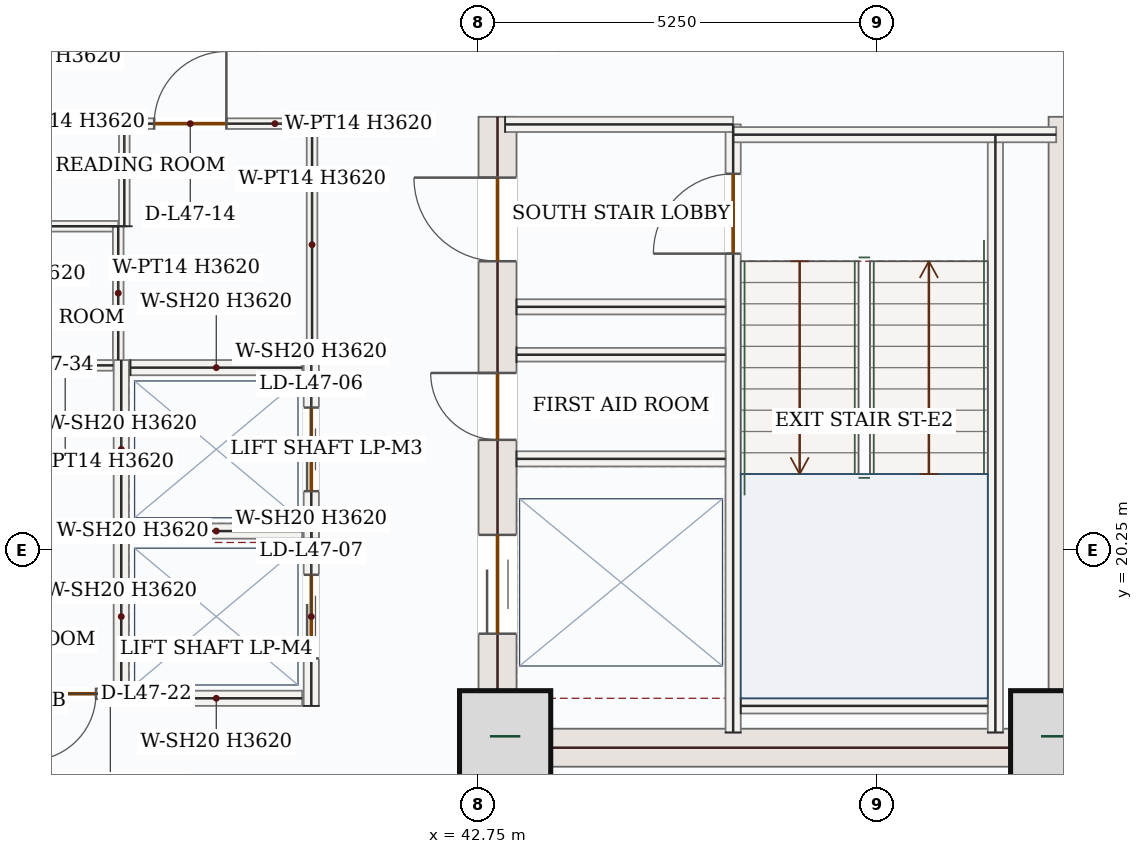
"""IFC4 building model, lengths in metres.
Left out: names, types, materials, properties, quantities, classifications, styles, units other than length and angle.
Written with IfcOpenShell. Run it as: python <this file> out.ifc"""

import sys

from ifc_helpers import new_model, si_unit, direction, frame, frame_2d, origin, origin_2d, place, context, subcontext, project, spatial, rectangle, extrude, source, transform, mapped, element, fill, save


model = new_model("IFC4")
c1 = context("Model", 3, precision=1e-05, world=origin(), true_north=direction((0.0, 1.0)))
c2 = subcontext(c1, "Body", "Model", "MODEL_VIEW")
j1 = project(units=[si_unit("LENGTHUNIT", "METRE"), si_unit("PLANEANGLEUNIT", "RADIAN")], contexts=[c1])
p1 = place(None, origin())
s1 = spatial("IfcSite", under=j1, at=p1, CompositionType="ELEMENT")
p2 = place(p1, origin())
s2 = spatial("IfcBuilding", under=s1, at=p2, CompositionType="ELEMENT")
p3 = place(p2, frame((0.0, 0.0, 201.9)))
s3 = spatial("IfcBuildingStorey", under=s2, at=p3, CompositionType="ELEMENT", Elevation=201.9)
p4 = place(p3, frame((43.0, 17.4, 0.0), z_axis=(0.0, 0.0, 1.0), x_axis=(0.0, 1.0, 0.0)))
e1 = element("IfcWall", 1, at=p4, inside=s3, PredefinedType="SHEAR", context=c2, shape_type="SweptSolid", body=[
    extrude(rectangle(XDim=8.55, YDim=0.5, at=frame_2d((4.275, 0.0))), origin(), (0.0, 0.0, 1.0), 3.62),
])
p5 = place(p4, frame((6.65, 0.0, 0.0)))
e2 = element("IfcOpeningElement", 2, at=p5, cuts=e1, PredefinedType="OPENING", context=c2, shape_type="SweptSolid", body=[
    extrude(rectangle(XDim=1.1, YDim=2.2, at=frame_2d((0.55, 1.1))), frame((0.0, 0.26, 0.0), z_axis=(0.0, -1.0, 0.0), x_axis=(1.0, 0.0, 0.0)), (0.0, 0.0, 1.0), 0.52),
])
p6 = place(p4, frame((1.75, 0.0, 0.0)))
e3 = element("IfcOpeningElement", 3, at=p6, cuts=e1, PredefinedType="OPENING", context=c2, shape_type="SweptSolid", body=[
    extrude(rectangle(XDim=1.3, YDim=2.2, at=frame_2d((0.65, 1.1))), frame((0.0, 0.26, 0.0), z_axis=(0.0, -1.0, 0.0), x_axis=(1.0, 0.0, 0.0)), (0.0, 0.0, 1.0), 0.52),
])
p7 = place(p4, frame((4.3, 0.0, 0.0)))
e4 = element("IfcOpeningElement", 4, at=p7, cuts=e1, PredefinedType="OPENING", context=c2, shape_type="SweptSolid", body=[
    extrude(rectangle(XDim=0.88, YDim=2.1, at=frame_2d((0.44, 1.05))), frame((0.0, 0.26, 0.0), z_axis=(0.0, -1.0, 0.0), x_axis=(1.0, 0.0, 0.0)), (0.0, 0.0, 1.0), 0.52),
])
m1 = source(origin(), c2, "Body", "SweptSolid", [
    extrude(rectangle(XDim=8.55, YDim=0.5, at=frame_2d((4.275, 0.0))), origin(), (0.0, 0.0, 1.0), 3.62),
])
p8 = place(p3, frame((50.5, 17.4, 0.0), z_axis=(0.0, 0.0, 1.0), x_axis=(0.0, 1.0, 0.0)))
e5 = element("IfcWall", 5, at=p8, inside=s3, PredefinedType="SHEAR", context=c2, shape_type="MappedRepresentation", body=[
    mapped(m1, transform((0.0, 0.0, 0.0), x_axis=(1.0, 0.0, 0.0), y_axis=(0.0, 1.0, 0.0), z_axis=(0.0, 0.0, 1.0), scale=1.0)),
])
m2 = source(origin(), c2, "Body", "SweptSolid", [
    extrude(rectangle(XDim=7.0, YDim=0.5, at=frame_2d((3.5, 0.0))), origin(), (0.0, 0.0, 1.0), 3.62),
])
p9 = place(p3, frame((43.25, 17.65, 0.0), z_axis=(0.0, 0.0, 1.0), x_axis=(1.0, 0.0, 0.0)))
e6 = element("IfcWall", 6, at=p9, inside=s3, PredefinedType="SHEAR", context=c2, shape_type="MappedRepresentation", body=[
    mapped(m2, transform((0.0, 0.0, 0.0), x_axis=(1.0, 0.0, 0.0), y_axis=(0.0, 1.0, 0.0), z_axis=(0.0, 0.0, 1.0), scale=1.0)),
])
m3 = source(origin(), c2, "Body", "SweptSolid", [
    extrude(rectangle(XDim=1.2, YDim=1.2, at=origin_2d()), origin(), (0.0, 0.0, 1.0), 3.9),
])
for number, where, z_axis, x_axis in (
    (7, (43.1, 17.8, 0.0), (0.0, 0.0, 1.0), (1.0, 0.0, 0.0)),
    (8, (50.35, 17.8, 0.0), (0.0, 0.0, 1.0), (1.0, 0.0, 0.0)),
):
    element("IfcColumn", number, at=place(p3, frame(where, z_axis=z_axis, x_axis=x_axis)), inside=s3, PredefinedType="COLUMN", context=c2, shape_type="MappedRepresentation", body=[
        mapped(m3, transform((0.0, 0.0, 0.0), x_axis=(1.0, 0.0, 0.0), y_axis=(0.0, 1.0, 0.0), z_axis=(0.0, 0.0, 1.0), scale=1.0)),
    ])
m4 = source(origin(), c2, "Body", "SweptSolid", [
    extrude(rectangle(XDim=5.258, YDim=0.28, at=frame_2d((2.629, 0.0))), origin(), (0.0, 0.0, 1.0), 3.62),
])
p10 = place(p3, frame((53.06, 18.458, 0.0), z_axis=(0.0, 0.0, 1.0), x_axis=(-0.707106781187, -0.707106781187, 0.0)))
e9 = element("IfcWall", 9, at=p10, inside=s3, PredefinedType="SOLIDWALL", context=c2, shape_type="MappedRepresentation", body=[
    mapped(m4, transform((0.0, 0.0, 0.0), x_axis=(1.0, 0.0, 0.0), y_axis=(0.0, 1.0, 0.0), z_axis=(0.0, 0.0, 1.0), scale=1.0)),
])
m5 = source(origin(), c2, "Body", "SweptSolid", [
    extrude(rectangle(XDim=7.87, YDim=0.2, at=frame_2d((3.935, 0.0))), origin(), (0.0, 0.0, 1.0), 3.62),
])
p11 = place(p3, frame((49.55, 17.85, 0.0), z_axis=(0.0, 0.0, 1.0), x_axis=(0.0, 1.0, 0.0)))
e10 = element("IfcWall", 10, at=p11, inside=s3, PredefinedType="SOLIDWALL", context=c2, shape_type="MappedRepresentation", body=[
    mapped(m5, transform((0.0, 0.0, 0.0), x_axis=(1.0, 0.0, 0.0), y_axis=(0.0, 1.0, 0.0), z_axis=(0.0, 0.0, 1.0), scale=1.0)),
])
p12 = place(p3, frame((46.1, 17.85, 0.0), z_axis=(0.0, 0.0, 1.0), x_axis=(0.0, 1.0, 0.0)))
e11 = element("IfcWall", 11, at=p12, inside=s3, PredefinedType="SOLIDWALL", context=c2, shape_type="SweptSolid", body=[
    extrude(rectangle(XDim=8.0, YDim=0.2, at=frame_2d((4.0, 0.0))), origin(), (0.0, 0.0, 1.0), 3.62),
])
p13 = place(p12, frame((6.3, 0.0, 0.0)))
e12 = element("IfcOpeningElement", 12, at=p13, cuts=e11, PredefinedType="OPENING", context=c2, shape_type="SweptSolid", body=[
    extrude(rectangle(XDim=1.05, YDim=2.15, at=frame_2d((0.525, 1.075))), frame((0.0, 0.11, 0.0), z_axis=(0.0, -1.0, 0.0), x_axis=(1.0, 0.0, 0.0)), (0.0, 0.0, 1.0), 0.22),
])
m6 = source(origin(), c2, "Body", "SweptSolid", [
    extrude(rectangle(XDim=3.0, YDim=0.2, at=frame_2d((1.5, 0.0))), origin(), (0.0, 0.0, 1.0), 3.62),
])
p14 = place(p3, frame((43.1, 25.85, 0.0), z_axis=(0.0, 0.0, 1.0), x_axis=(1.0, 0.0, 0.0)))
e13 = element("IfcWall", 13, at=p14, inside=s3, PredefinedType="SOLIDWALL", context=c2, shape_type="MappedRepresentation", body=[
    mapped(m6, transform((0.0, 0.0, 0.0), x_axis=(1.0, 0.0, 0.0), y_axis=(0.0, 1.0, 0.0), z_axis=(0.0, 0.0, 1.0), scale=1.0)),
])
m7 = source(origin(), c2, "Body", "SweptSolid", [
    extrude(rectangle(XDim=4.25, YDim=0.2, at=frame_2d((2.125, 0.0))), origin(), (0.0, 0.0, 1.0), 3.62),
])
p15 = place(p3, frame((46.1, 25.715, 0.0), z_axis=(0.0, 0.0, 1.0), x_axis=(1.0, 0.0, 0.0)))
e14 = element("IfcWall", 14, at=p15, inside=s3, PredefinedType="SOLIDWALL", context=c2, shape_type="MappedRepresentation", body=[
    mapped(m7, transform((0.0, 0.0, 0.0), x_axis=(1.0, 0.0, 0.0), y_axis=(0.0, 1.0, 0.0), z_axis=(0.0, 0.0, 1.0), scale=1.0)),
])
m8 = source(origin(), c2, "Body", "SweptSolid", [
    extrude(rectangle(XDim=3.25, YDim=0.2, at=frame_2d((1.625, 0.0))), origin(), (0.0, 0.0, 1.0), 3.62),
])
p16 = place(p3, frame((46.2, 18.2, 0.0), z_axis=(0.0, 0.0, 1.0), x_axis=(1.0, 0.0, 0.0)))
e15 = element("IfcWall", 15, at=p16, inside=s3, PredefinedType="SOLIDWALL", context=c2, shape_type="MappedRepresentation", body=[
    mapped(m8, transform((0.0, 0.0, 0.0), x_axis=(1.0, 0.0, 0.0), y_axis=(0.0, 1.0, 0.0), z_axis=(0.0, 0.0, 1.0), scale=1.0)),
])
m9 = source(origin(), c2, "Body", "SweptSolid", [
    extrude(rectangle(XDim=2.75, YDim=0.2, at=frame_2d((1.375, 0.0))), origin(), (0.0, 0.0, 1.0), 3.62),
])
for number, where, z_axis, x_axis in (
    (16, (43.25, 23.45, 0.0), (0.0, 0.0, 1.0), (1.0, 0.0, 0.0)),
    (17, (43.25, 21.45, 0.0), (0.0, 0.0, 1.0), (1.0, 0.0, 0.0)),
):
    element("IfcWall", number, at=place(p3, frame(where, z_axis=z_axis, x_axis=x_axis)), inside=s3, PredefinedType="SOLIDWALL", context=c2, shape_type="MappedRepresentation", body=[
        mapped(m9, transform((0.0, 0.0, 0.0), x_axis=(1.0, 0.0, 0.0), y_axis=(0.0, 1.0, 0.0), z_axis=(0.0, 0.0, 1.0), scale=1.0)),
    ])
m10 = source(origin(), c2, "Body", "SweptSolid", [
    extrude(rectangle(XDim=2.75, YDim=0.18, at=frame_2d((1.375, 0.0))), origin(), (0.0, 0.0, 1.0), 3.62),
])
p17 = place(p3, frame((43.25, 22.82, 0.0), z_axis=(0.0, 0.0, 1.0), x_axis=(1.0, 0.0, 0.0)))
e18 = element("IfcWall", 18, at=p17, inside=s3, PredefinedType="PARTITIONING", context=c2, shape_type="MappedRepresentation", body=[
    mapped(m10, transform((0.0, 0.0, 0.0), x_axis=(1.0, 0.0, 0.0), y_axis=(0.0, 1.0, 0.0), z_axis=(0.0, 0.0, 1.0), scale=1.0)),
])
m11 = source(origin(), c2, "Body", "SweptSolid", [
    extrude(rectangle(XDim=2.35, YDim=0.2, at=frame_2d((1.175, 0.0))), origin(), (0.0, 0.0, 1.0), 3.62),
])
p18 = place(p3, frame((38.05, 20.4, 0.0), z_axis=(0.0, 0.0, 1.0), x_axis=(0.0, 1.0, 0.0)))
e19 = element("IfcWall", 19, at=p18, inside=s3, PredefinedType="SOLIDWALL", context=c2, shape_type="MappedRepresentation", body=[
    mapped(m11, transform((0.0, 0.0, 0.0), x_axis=(1.0, 0.0, 0.0), y_axis=(0.0, 1.0, 0.0), z_axis=(0.0, 0.0, 1.0), scale=1.0)),
])
p19 = place(p3, frame((40.55, 20.4, 0.0), z_axis=(0.0, 0.0, 1.0), x_axis=(0.0, 1.0, 0.0)))
e20 = element("IfcWall", 20, at=p19, inside=s3, PredefinedType="SOLIDWALL", context=c2, shape_type="SweptSolid", body=[
    extrude(rectangle(XDim=2.35, YDim=0.2, at=frame_2d((1.175, 0.0))), origin(), (0.0, 0.0, 1.0), 3.62),
])
p20 = place(p19, frame((0.625, 0.0, 0.0)))
e21 = element("IfcOpeningElement", 21, at=p20, cuts=e20, PredefinedType="OPENING", context=c2, shape_type="SweptSolid", body=[
    extrude(rectangle(XDim=1.1, YDim=2.15, at=frame_2d((0.55, 1.075))), frame((0.0, 0.11, 0.0), z_axis=(0.0, -1.0, 0.0), x_axis=(1.0, 0.0, 0.0)), (0.0, 0.0, 1.0), 0.22),
])
m12 = source(origin(), c2, "Body", "SweptSolid", [
    extrude(rectangle(XDim=2.26, YDim=0.2, at=frame_2d((1.13, 0.0))), origin(), (0.0, 0.0, 1.0), 3.62),
])
for number, where, z_axis, x_axis in (
    (22, (38.17, 20.5, 0.0), (0.0, 0.0, 1.0), (1.0, 0.0, 0.0)),
    (23, (38.17, 22.65, 0.0), (0.0, 0.0, 1.0), (1.0, 0.0, 0.0)),
):
    element("IfcWall", number, at=place(p3, frame(where, z_axis=z_axis, x_axis=x_axis)), inside=s3, PredefinedType="SOLIDWALL", context=c2, shape_type="MappedRepresentation", body=[
        mapped(m12, transform((0.0, 0.0, 0.0), x_axis=(1.0, 0.0, 0.0), y_axis=(0.0, 1.0, 0.0), z_axis=(0.0, 0.0, 1.0), scale=1.0)),
    ])
p21 = place(p3, frame((38.05, 18.2, 0.0), z_axis=(0.0, 0.0, 1.0), x_axis=(0.0, 1.0, 0.0)))
e24 = element("IfcWall", 24, at=p21, inside=s3, PredefinedType="SOLIDWALL", context=c2, shape_type="MappedRepresentation", body=[
    mapped(m11, transform((0.0, 0.0, 0.0), x_axis=(1.0, 0.0, 0.0), y_axis=(0.0, 1.0, 0.0), z_axis=(0.0, 0.0, 1.0), scale=1.0)),
])
p22 = place(p3, frame((40.55, 18.2, 0.0), z_axis=(0.0, 0.0, 1.0), x_axis=(0.0, 1.0, 0.0)))
e25 = element("IfcWall", 25, at=p22, inside=s3, PredefinedType="SOLIDWALL", context=c2, shape_type="SweptSolid", body=[
    extrude(rectangle(XDim=2.35, YDim=0.2, at=frame_2d((1.175, 0.0))), origin(), (0.0, 0.0, 1.0), 3.62),
])
p23 = place(p22, frame((0.625, 0.0, 0.0)))
e26 = element("IfcOpeningElement", 26, at=p23, cuts=e25, PredefinedType="OPENING", context=c2, shape_type="SweptSolid", body=[
    extrude(rectangle(XDim=1.1, YDim=2.15, at=frame_2d((0.55, 1.075))), frame((0.0, 0.11, 0.0), z_axis=(0.0, -1.0, 0.0), x_axis=(1.0, 0.0, 0.0)), (0.0, 0.0, 1.0), 0.22),
])
p24 = place(p3, frame((38.17, 18.3, 0.0), z_axis=(0.0, 0.0, 1.0), x_axis=(1.0, 0.0, 0.0)))
e27 = element("IfcWall", 27, at=p24, inside=s3, PredefinedType="SOLIDWALL", context=c2, shape_type="MappedRepresentation", body=[
    mapped(m12, transform((0.0, 0.0, 0.0), x_axis=(1.0, 0.0, 0.0), y_axis=(0.0, 1.0, 0.0), z_axis=(0.0, 0.0, 1.0), scale=1.0)),
])
m13 = source(origin(), c2, "Body", "SweptSolid", [
    extrude(rectangle(XDim=1.265, YDim=0.14, at=frame_2d((0.633, 0.0))), origin(), (0.0, 0.0, 1.0), 3.62),
])
p25 = place(p3, frame((36.68, 22.68, 0.0), z_axis=(0.0, 0.0, 1.0), x_axis=(1.0, 0.0, 0.0)))
e28 = element("IfcWall", 28, at=p25, inside=s3, PredefinedType="PARTITIONING", context=c2, shape_type="MappedRepresentation", body=[
    mapped(m13, transform((0.0, 0.0, 0.0), x_axis=(1.0, 0.0, 0.0), y_axis=(0.0, 1.0, 0.0), z_axis=(0.0, 0.0, 1.0), scale=1.0)),
])
p26 = place(p3, frame((37.945, 18.36, 0.0), z_axis=(0.0, 0.0, 1.0), x_axis=(-1.0, 0.0, 0.0)))
e29 = element("IfcWall", 29, at=p26, inside=s3, PredefinedType="PARTITIONING", context=c2, shape_type="SweptSolid", body=[
    extrude(rectangle(XDim=1.23, YDim=0.14, at=frame_2d((0.615, 0.0))), origin(), (0.0, 0.0, 1.0), 3.62),
])
p27 = place(p26, frame((0.228, 0.0, 0.0)))
e30 = element("IfcOpeningElement", 30, at=p27, cuts=e29, PredefinedType="OPENING", context=c2, shape_type="SweptSolid", body=[
    extrude(rectangle(XDim=0.88, YDim=2.1, at=frame_2d((0.44, 1.05))), frame((0.0, 0.08, 0.0), z_axis=(0.0, -1.0, 0.0), x_axis=(1.0, 0.0, 0.0)), (0.0, 0.0, 1.0), 0.16),
])
m14 = source(origin(), c2, "Body", "SweptSolid", [
    extrude(rectangle(XDim=3.945, YDim=0.14, at=frame_2d((1.973, 0.0))), origin(), (0.0, 0.0, 1.0), 3.62),
])
p28 = place(p3, frame((34.065, 24.51, 0.0), z_axis=(0.0, 0.0, 1.0), x_axis=(1.0, 0.0, 0.0)))
e31 = element("IfcWall", 31, at=p28, inside=s3, PredefinedType="PARTITIONING", context=c2, shape_type="MappedRepresentation", body=[
    mapped(m14, transform((0.0, 0.0, 0.0), x_axis=(1.0, 0.0, 0.0), y_axis=(0.0, 1.0, 0.0), z_axis=(0.0, 0.0, 1.0), scale=1.0)),
])
m15 = source(origin(), c2, "Body", "SweptSolid", [
    extrude(rectangle(XDim=1.76, YDim=0.14, at=frame_2d((0.88, 0.0))), origin(), (0.0, 0.0, 1.0), 3.62),
])
p29 = place(p3, frame((38.01, 24.51, 0.0), z_axis=(0.0, 0.0, 1.0), x_axis=(0.0, -1.0, 0.0)))
e32 = element("IfcWall", 32, at=p29, inside=s3, PredefinedType="PARTITIONING", context=c2, shape_type="MappedRepresentation", body=[
    mapped(m15, transform((0.0, 0.0, 0.0), x_axis=(1.0, 0.0, 0.0), y_axis=(0.0, 1.0, 0.0), z_axis=(0.0, 0.0, 1.0), scale=1.0)),
])
m16 = source(origin(), c2, "Body", "SweptSolid", [
    extrude(rectangle(XDim=1.35, YDim=0.14, at=frame_2d((0.675, 0.0))), origin(), (0.0, 0.0, 1.0), 3.62),
])
p30 = place(p3, frame((38.09, 24.51, 0.0), z_axis=(0.0, 0.0, 1.0), x_axis=(0.0, 1.0, 0.0)))
e33 = element("IfcWall", 33, at=p30, inside=s3, PredefinedType="PARTITIONING", context=c2, shape_type="MappedRepresentation", body=[
    mapped(m16, transform((0.0, 0.0, 0.0), x_axis=(1.0, 0.0, 0.0), y_axis=(0.0, 1.0, 0.0), z_axis=(0.0, 0.0, 1.0), scale=1.0)),
])
p31 = place(p3, frame((38.165, 25.86, 0.0), z_axis=(0.0, 0.0, 1.0), x_axis=(1.0, 0.0, 0.0)))
e34 = element("IfcWall", 34, at=p31, inside=s3, PredefinedType="PARTITIONING", context=c2, shape_type="SweptSolid", body=[
    extrude(rectangle(XDim=2.395, YDim=0.14, at=frame_2d((1.198, 0.0))), origin(), (0.0, 0.0, 1.0), 3.62),
])
p32 = place(p31, frame((0.318, 0.0, 0.0)))
e35 = element("IfcOpeningElement", 35, at=p32, cuts=e34, PredefinedType="OPENING", context=c2, shape_type="SweptSolid", body=[
    extrude(rectangle(XDim=0.95, YDim=2.15, at=frame_2d((0.475, 1.075))), frame((0.0, 0.08, 0.0), z_axis=(0.0, -1.0, 0.0), x_axis=(1.0, 0.0, 0.0)), (0.0, 0.0, 1.0), 0.16),
])
m17 = source(origin(), c2, "Body", "SweptSolid", [
    extrude(rectangle(XDim=3.035, YDim=0.14, at=frame_2d((1.518, 0.0))), origin(), (0.0, 0.0, 1.0), 3.62),
])
p33 = place(p3, frame((40.56, 25.785, 0.0), z_axis=(0.0, 0.0, 1.0), x_axis=(0.0, -1.0, 0.0)))
e36 = element("IfcWall", 36, at=p33, inside=s3, PredefinedType="PARTITIONING", context=c2, shape_type="MappedRepresentation", body=[
    mapped(m17, transform((0.0, 0.0, 0.0), x_axis=(1.0, 0.0, 0.0), y_axis=(0.0, 1.0, 0.0), z_axis=(0.0, 0.0, 1.0), scale=1.0)),
])
m18 = source(origin(), c2, "Body", "SweptSolid", [
    extrude(rectangle(XDim=1.05, YDim=2.15, at=frame_2d((0.525, 1.075))), frame((0.0, 0.025, 0.0), z_axis=(0.0, -1.0, 0.0), x_axis=(1.0, 0.0, 0.0)), (0.0, 0.0, 1.0), 0.05),
])
p34 = place(p13, origin())
e37 = element("IfcDoor", 37, at=p34, inside=s3, OperationType="SINGLE_SWING_LEFT", PredefinedType="DOOR", context=c2, shape_type="MappedRepresentation", body=[
    mapped(m18, transform((0.0, 0.0, 0.0), x_axis=(1.0, 0.0, 0.0), y_axis=(0.0, 1.0, 0.0), z_axis=(0.0, 0.0, 1.0), scale=1.0)),
])
fill(e12, e37)
m19 = source(origin(), c2, "Body", "SweptSolid", [
    extrude(rectangle(XDim=1.1, YDim=2.2, at=frame_2d((0.55, 1.1))), frame((0.0, 0.025, 0.0), z_axis=(0.0, -1.0, 0.0), x_axis=(1.0, 0.0, 0.0)), (0.0, 0.0, 1.0), 0.05),
])
p35 = place(p5, origin())
e38 = element("IfcDoor", 38, at=p35, inside=s3, OperationType="SINGLE_SWING_RIGHT", PredefinedType="DOOR", context=c2, shape_type="MappedRepresentation", body=[
    mapped(m19, transform((0.0, 0.0, 0.0), x_axis=(1.0, 0.0, 0.0), y_axis=(0.0, 1.0, 0.0), z_axis=(0.0, 0.0, 1.0), scale=1.0)),
])
fill(e2, e38)
m20 = source(origin(), c2, "Body", "SweptSolid", [
    extrude(rectangle(XDim=1.3, YDim=2.2, at=frame_2d((0.65, 1.1))), frame((0.0, 0.025, 0.0), z_axis=(0.0, -1.0, 0.0), x_axis=(1.0, 0.0, 0.0)), (0.0, 0.0, 1.0), 0.05),
])
p36 = place(p6, origin())
e39 = element("IfcDoor", 39, at=p36, inside=s3, OperationType="DOUBLE_DOOR_SLIDING", PredefinedType="DOOR", context=c2, shape_type="MappedRepresentation", body=[
    mapped(m20, transform((0.0, 0.0, 0.0), x_axis=(1.0, 0.0, 0.0), y_axis=(0.0, 1.0, 0.0), z_axis=(0.0, 0.0, 1.0), scale=1.0)),
])
fill(e3, e39)
m21 = source(origin(), c2, "Body", "SweptSolid", [
    extrude(rectangle(XDim=0.88, YDim=2.1, at=frame_2d((0.44, 1.05))), frame((0.0, 0.025, 0.0), z_axis=(0.0, -1.0, 0.0), x_axis=(1.0, 0.0, 0.0)), (0.0, 0.0, 1.0), 0.05),
])
p37 = place(p7, origin())
e40 = element("IfcDoor", 40, at=p37, inside=s3, OperationType="SINGLE_SWING_RIGHT", PredefinedType="DOOR", context=c2, shape_type="MappedRepresentation", body=[
    mapped(m21, transform((0.0, 0.0, 0.0), x_axis=(1.0, 0.0, 0.0), y_axis=(0.0, 1.0, 0.0), z_axis=(0.0, 0.0, 1.0), scale=1.0)),
])
fill(e4, e40)
m22 = source(origin(), c2, "Body", "SweptSolid", [
    extrude(rectangle(XDim=1.1, YDim=2.15, at=frame_2d((0.55, 1.075))), frame((0.0, 0.025, 0.0), z_axis=(0.0, -1.0, 0.0), x_axis=(1.0, 0.0, 0.0)), (0.0, 0.0, 1.0), 0.05),
])
p38 = place(p20, origin())
e41 = element("IfcDoor", 41, at=p38, inside=s3, OperationType="DOUBLE_DOOR_SLIDING", PredefinedType="DOOR", context=c2, shape_type="MappedRepresentation", body=[
    mapped(m22, transform((0.0, 0.0, 0.0), x_axis=(1.0, 0.0, 0.0), y_axis=(0.0, 1.0, 0.0), z_axis=(0.0, 0.0, 1.0), scale=1.0)),
])
fill(e21, e41)
p39 = place(p23, origin())
e42 = element("IfcDoor", 42, at=p39, inside=s3, OperationType="DOUBLE_DOOR_SLIDING", PredefinedType="DOOR", context=c2, shape_type="MappedRepresentation", body=[
    mapped(m22, transform((0.0, 0.0, 0.0), x_axis=(1.0, 0.0, 0.0), y_axis=(0.0, 1.0, 0.0), z_axis=(0.0, 0.0, 1.0), scale=1.0)),
])
fill(e26, e42)
m23 = source(origin(), c2, "Body", "SweptSolid", [
    extrude(rectangle(XDim=0.95, YDim=2.15, at=frame_2d((0.475, 1.075))), frame((0.0, 0.025, 0.0), z_axis=(0.0, -1.0, 0.0), x_axis=(1.0, 0.0, 0.0)), (0.0, 0.0, 1.0), 0.05),
])
p40 = place(p32, origin())
e43 = element("IfcDoor", 43, at=p40, inside=s3, OperationType="SINGLE_SWING_RIGHT", PredefinedType="DOOR", context=c2, shape_type="MappedRepresentation", body=[
    mapped(m23, transform((0.0, 0.0, 0.0), x_axis=(1.0, 0.0, 0.0), y_axis=(0.0, 1.0, 0.0), z_axis=(0.0, 0.0, 1.0), scale=1.0)),
])
fill(e35, e43)
p41 = place(p27, origin())
e44 = element("IfcDoor", 44, at=p41, inside=s3, OperationType="SINGLE_SWING_RIGHT", PredefinedType="DOOR", context=c2, shape_type="MappedRepresentation", body=[
    mapped(m21, transform((0.0, 0.0, 0.0), x_axis=(1.0, 0.0, 0.0), y_axis=(0.0, 1.0, 0.0), z_axis=(0.0, 0.0, 1.0), scale=1.0)),
])
fill(e30, e44)
save(model, sys.argv[1])
